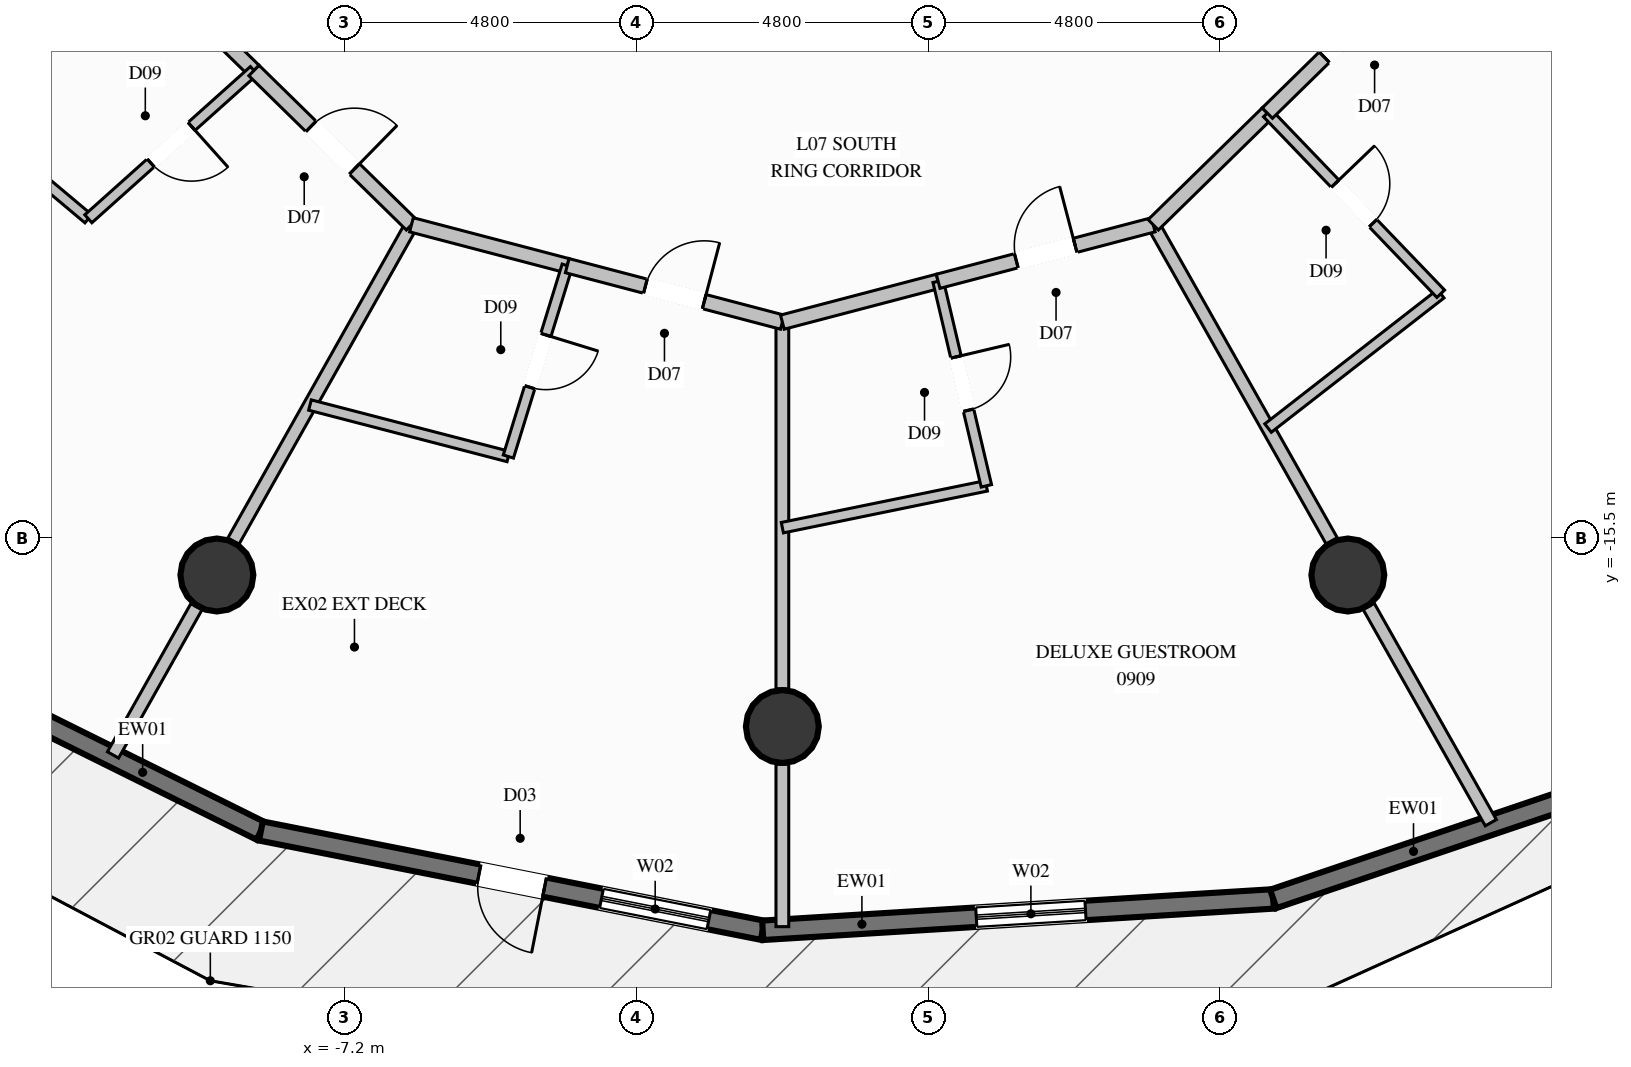
"""IFC4 building model, lengths in metres.
Left out: names, types, materials, properties, quantities, classifications, styles, units other than length and angle.
Written with IfcOpenShell. Run it as: python <this file> out.ifc"""

import sys

from ifc_helpers import new_model, si_unit, direction, frame, frame_2d, origin, origin_2d, place, context, subcontext, project, spatial, rectangle, circle, extrude, element, fill, save


model = new_model("IFC4")
c1 = context("Model", 3, precision=1e-05, world=origin(), true_north=direction((0.0, 1.0)))
c2 = subcontext(c1, "Body", "Model", "MODEL_VIEW")
j1 = project(units=[si_unit("LENGTHUNIT", "METRE"), si_unit("PLANEANGLEUNIT", "RADIAN")], contexts=[c1])
p1 = place(None, origin())
s1 = spatial("IfcSite", under=j1, at=p1, CompositionType="ELEMENT")
p2 = place(p1, origin())
s2 = spatial("IfcBuilding", under=s1, at=p2, CompositionType="ELEMENT")
p3 = place(p2, frame((0.0, 0.0, 35.6)))
s3 = spatial("IfcBuildingStorey", under=s2, at=p3, CompositionType="ELEMENT", Elevation=35.6)
for number, where, z_axis, x_axis in (
    (1, (-9.3, -16.108, 0.0), (0.0, 0.0, 1.0), (1.0, 0.0, 0.0)),
    (2, (0.0, -18.6, 0.0), (0.0, 0.0, 1.0), (1.0, 0.0, 0.0)),
    (3, (9.3, -16.108, 0.0), (0.0, 0.0, 1.0), (1.0, 0.0, 0.0)),
):
    element("IfcColumn", number, at=place(p3, frame(where, z_axis=z_axis, x_axis=x_axis)), inside=s3, PredefinedType="COLUMN", context=c2, shape_type="SweptSolid", body=[
        extrude(circle(Radius=0.6, at=origin_2d()), origin(), (0.0, 0.0, 1.0), 3.6),
    ])
p4 = place(p3, frame((-8.576, -20.318, 0.0), z_axis=(0.0, 0.0, 1.0), x_axis=(-0.895818759339, 0.444419565743, 0.0)))
e4 = element("IfcWall", 4, at=p4, inside=s3, PredefinedType="SOLIDWALL", context=c2, shape_type="SweptSolid", body=[
    extrude(rectangle(XDim=8.15, YDim=0.32, at=frame_2d((4.075, 0.0))), origin(), (0.0, 0.0, 1.0), 3.34),
])
p5 = place(p4, frame((4.592, 0.0, 0.35)))
e5 = element("IfcOpeningElement", 5, at=p5, cuts=e4, PredefinedType="OPENING", context=c2, shape_type="SweptSolid", body=[
    extrude(rectangle(XDim=1.8, YDim=2.6, at=frame_2d((0.9, 1.3))), frame((0.0, 0.17, 0.0), z_axis=(0.0, -1.0, 0.0), x_axis=(1.0, 0.0, 0.0)), (0.0, 0.0, 1.0), 0.34),
])
p6 = place(p3, frame((-0.323, -21.951, 0.0), z_axis=(0.0, 0.0, 1.0), x_axis=(-0.980984848571, 0.194084329288, 0.0)))
e6 = element("IfcWall", 6, at=p6, inside=s3, PredefinedType="SOLIDWALL", context=c2, shape_type="SweptSolid", body=[
    extrude(rectangle(XDim=8.413, YDim=0.32, at=frame_2d((4.207, 0.0))), origin(), (0.0, 0.0, 1.0), 3.34),
])
p7 = place(p6, frame((0.903, 0.0, 0.35)))
e7 = element("IfcOpeningElement", 7, at=p7, cuts=e6, PredefinedType="OPENING", context=c2, shape_type="SweptSolid", body=[
    extrude(rectangle(XDim=1.8, YDim=2.6, at=frame_2d((0.9, 1.3))), frame((0.0, 0.17, 0.0), z_axis=(0.0, -1.0, 0.0), x_axis=(1.0, 0.0, 0.0)), (0.0, 0.0, 1.0), 0.34),
])
p8 = place(p6, frame((3.657, 0.0, 0.0)))
e8 = element("IfcOpeningElement", 8, at=p8, cuts=e6, PredefinedType="OPENING", context=c2, shape_type="SweptSolid", body=[
    extrude(rectangle(XDim=1.1, YDim=2.2, at=frame_2d((0.55, 1.1))), frame((0.0, 0.17, 0.0), z_axis=(0.0, -1.0, 0.0), x_axis=(1.0, 0.0, 0.0)), (0.0, 0.0, 1.0), 0.34),
])
p9 = place(p3, frame((8.073, -21.435, 0.0), z_axis=(0.0, 0.0, 1.0), x_axis=(-0.998117750792, -0.06132663005, 0.0)))
e9 = element("IfcWall", 9, at=p9, inside=s3, PredefinedType="SOLIDWALL", context=c2, shape_type="SweptSolid", body=[
    extrude(rectangle(XDim=8.412, YDim=0.32, at=frame_2d((4.206, 0.0))), origin(), (0.0, 0.0, 1.0), 3.34),
])
p10 = place(p9, frame((3.093, 0.0, 0.35)))
e10 = element("IfcOpeningElement", 10, at=p10, cuts=e9, PredefinedType="OPENING", context=c2, shape_type="SweptSolid", body=[
    extrude(rectangle(XDim=1.8, YDim=2.6, at=frame_2d((0.9, 1.3))), frame((0.0, 0.17, 0.0), z_axis=(0.0, -1.0, 0.0), x_axis=(1.0, 0.0, 0.0)), (0.0, 0.0, 1.0), 0.34),
])
p11 = place(p3, frame((15.793, -18.821, 0.0), z_axis=(0.0, 0.0, 1.0), x_axis=(-0.94717495877, -0.320717317085, 0.0)))
e11 = element("IfcWall", 11, at=p11, inside=s3, PredefinedType="SOLIDWALL", context=c2, shape_type="SweptSolid", body=[
    extrude(rectangle(XDim=8.151, YDim=0.32, at=frame_2d((4.075, 0.0))), origin(), (0.0, 0.0, 1.0), 3.34),
])
p12 = place(p11, frame((1.229, 0.0, 0.35)))
e12 = element("IfcOpeningElement", 12, at=p12, cuts=e11, PredefinedType="OPENING", context=c2, shape_type="SweptSolid", body=[
    extrude(rectangle(XDim=1.8, YDim=2.6, at=frame_2d((0.9, 1.3))), frame((0.0, 0.17, 0.0), z_axis=(0.0, -1.0, 0.0), x_axis=(1.0, 0.0, 0.0)), (0.0, 0.0, 1.0), 0.34),
])
p13 = place(p3, frame((-10.566, -5.975, 0.0), z_axis=(0.0, 0.0, 1.0), x_axis=(-0.861473203585, -0.507803032194, 0.0)))
e13 = element("IfcWall", 13, at=p13, inside=s3, PredefinedType="PARTITIONING", context=c2, shape_type="SweptSolid", body=[
    extrude(rectangle(XDim=5.845, YDim=0.21, at=frame_2d((2.922, 0.0))), origin(), (0.0, 0.0, 1.0), 2.707),
])
p14 = place(p3, frame((-6.1, -10.349, 0.0), z_axis=(0.0, 0.0, 1.0), x_axis=(-0.490503945764, -0.871438970433, 0.0)))
e14 = element("IfcWall", 14, at=p14, inside=s3, PredefinedType="PARTITIONING", context=c2, shape_type="SweptSolid", body=[
    extrude(rectangle(XDim=5.969, YDim=0.21, at=frame_2d((2.985, 0.0))), origin(), (0.0, 0.0, 1.0), 2.707),
])
p15 = place(p3, frame((-9.636, -16.629, 0.0), z_axis=(0.0, 0.0, 1.0), x_axis=(-0.490451821351, -0.871468307475, 0.0)))
e15 = element("IfcWall", 15, at=p15, inside=s3, PredefinedType="PARTITIONING", context=c2, shape_type="SweptSolid", body=[
    extrude(rectangle(XDim=2.798, YDim=0.21, at=frame_2d((1.399, 0.0))), origin(), (0.0, 0.0, 1.0), 3.34),
])
p16 = place(p3, frame((0.0, -11.95, 0.0), z_axis=(0.0, 0.0, 1.0), x_axis=(0.0, -1.0, 0.0)))
e16 = element("IfcWall", 16, at=p16, inside=s3, PredefinedType="PARTITIONING", context=c2, shape_type="SweptSolid", body=[
    extrude(rectangle(XDim=6.03, YDim=0.21, at=frame_2d((3.015, 0.0))), origin(), (0.0, 0.0, 1.0), 2.707),
])
p17 = place(p3, frame((0.0, -19.22, 0.0), z_axis=(0.0, 0.0, 1.0), x_axis=(0.0, -1.0, 0.0)))
e17 = element("IfcWall", 17, at=p17, inside=s3, PredefinedType="PARTITIONING", context=c2, shape_type="SweptSolid", body=[
    extrude(rectangle(XDim=2.671, YDim=0.21, at=frame_2d((1.335, 0.0))), origin(), (0.0, 0.0, 1.0), 3.34),
])
p18 = place(p3, frame((6.1, -10.349, 0.0), z_axis=(0.0, 0.0, 1.0), x_axis=(0.491652896219, -0.870791266401, 0.0)))
e18 = element("IfcWall", 18, at=p18, inside=s3, PredefinedType="PARTITIONING", context=c2, shape_type="SweptSolid", body=[
    extrude(rectangle(XDim=5.969, YDim=0.21, at=frame_2d((2.985, 0.0))), origin(), (0.0, 0.0, 1.0), 2.707),
])
p19 = place(p3, frame((9.643, -16.624, 0.0), z_axis=(0.0, 0.0, 1.0), x_axis=(0.491698874435, -0.87076530528, 0.0)))
e19 = element("IfcWall", 19, at=p19, inside=s3, PredefinedType="PARTITIONING", context=c2, shape_type="SweptSolid", body=[
    extrude(rectangle(XDim=4.086, YDim=0.21, at=frame_2d((2.043, 0.0))), origin(), (0.0, 0.0, 1.0), 3.34),
])
p20 = place(p3, frame((10.566, -5.975, 0.0), z_axis=(0.0, 0.0, 1.0), x_axis=(0.862217531027, -0.506538181374, 0.0)))
e20 = element("IfcWall", 20, at=p20, inside=s3, PredefinedType="PARTITIONING", context=c2, shape_type="SweptSolid", body=[
    extrude(rectangle(XDim=5.845, YDim=0.21, at=frame_2d((2.923, 0.0))), origin(), (0.0, 0.0, 1.0), 2.707),
])
p21 = place(p3, frame((-10.566, -5.975, 0.0), z_axis=(0.0, 0.0, 1.0), x_axis=(0.714506552913, -0.699628748584, 0.0)))
e21 = element("IfcWall", 21, at=p21, inside=s3, PredefinedType="PARTITIONING", context=c2, shape_type="SweptSolid", body=[
    extrude(rectangle(XDim=2.625, YDim=0.24, at=frame_2d((1.313, 0.0))), origin(), (0.0, 0.0, 1.0), 3.34),
])
p22 = place(p3, frame((-14.055, -8.032, 0.0), z_axis=(0.0, 0.0, 1.0), x_axis=(0.765749489357, -0.643138958196, 0.0)))
e22 = element("IfcWall", 22, at=p22, inside=s3, PredefinedType="PLUMBINGWALL", context=c2, shape_type="SweptSolid", body=[
    extrude(rectangle(XDim=3.449, YDim=0.175, at=frame_2d((1.724, 0.0))), origin(), (0.0, 0.0, 1.0), 3.34),
])
p23 = place(p3, frame((-8.69, -7.812, 0.0), z_axis=(0.0, 0.0, 1.0), x_axis=(-0.745157470099, -0.666888554975, 0.0)))
e23 = element("IfcWall", 23, at=p23, inside=s3, PredefinedType="PLUMBINGWALL", context=c2, shape_type="SweptSolid", body=[
    extrude(rectangle(XDim=3.656, YDim=0.175, at=frame_2d((1.828, 0.0))), origin(), (0.0, 0.0, 1.0), 3.34),
])
p24 = place(p23, frame((1.378, 0.0, 0.0)))
e24 = element("IfcOpeningElement", 24, at=p24, cuts=e23, PredefinedType="OPENING", context=c2, shape_type="SweptSolid", body=[
    extrude(rectangle(XDim=0.9, YDim=2.1, at=frame_2d((0.45, 1.05))), frame((0.0, 0.098, 0.0), z_axis=(0.0, -1.0, 0.0), x_axis=(1.0, 0.0, 0.0)), (0.0, 0.0, 1.0), 0.195),
])
p25 = place(p3, frame((-8.69, -7.812, 0.0), z_axis=(0.0, 0.0, 1.0), x_axis=(0.714342093268, -0.699796666029, 0.0)))
e25 = element("IfcWall", 25, at=p25, inside=s3, PredefinedType="PARTITIONING", context=c2, shape_type="SweptSolid", body=[
    extrude(rectangle(XDim=3.625, YDim=0.24, at=frame_2d((1.813, 0.0))), origin(), (0.0, 0.0, 1.0), 3.34),
])
p26 = place(p25, frame((1.313, 0.0, 0.0)))
e26 = element("IfcOpeningElement", 26, at=p26, cuts=e25, PredefinedType="OPENING", context=c2, shape_type="SweptSolid", body=[
    extrude(rectangle(XDim=1.0, YDim=2.2, at=frame_2d((0.5, 1.1))), frame((0.0, 0.13, 0.0), z_axis=(0.0, -1.0, 0.0), x_axis=(1.0, 0.0, 0.0)), (0.0, 0.0, 1.0), 0.26),
])
p27 = place(p3, frame((-6.1, -10.349, 0.0), z_axis=(0.0, 0.0, 1.0), x_axis=(0.967291490053, -0.253667446219, 0.0)))
e27 = element("IfcWall", 27, at=p27, inside=s3, PredefinedType="PARTITIONING", context=c2, shape_type="SweptSolid", body=[
    extrude(rectangle(XDim=2.649, YDim=0.24, at=frame_2d((1.324, 0.0))), origin(), (0.0, 0.0, 1.0), 3.34),
])
p28 = place(p3, frame((-7.769, -13.313, 0.0), z_axis=(0.0, 0.0, 1.0), x_axis=(0.96792648556, -0.251233593596, 0.0)))
e28 = element("IfcWall", 28, at=p28, inside=s3, PredefinedType="PLUMBINGWALL", context=c2, shape_type="SweptSolid", body=[
    extrude(rectangle(XDim=3.371, YDim=0.175, at=frame_2d((1.686, 0.0))), origin(), (0.0, 0.0, 1.0), 3.34),
])
p29 = place(p3, frame((-3.538, -11.021, 0.0), z_axis=(0.0, 0.0, 1.0), x_axis=(-0.294696857094, -0.955590792347, 0.0)))
e29 = element("IfcWall", 29, at=p29, inside=s3, PredefinedType="PLUMBINGWALL", context=c2, shape_type="SweptSolid", body=[
    extrude(rectangle(XDim=3.285, YDim=0.175, at=frame_2d((1.643, 0.0))), origin(), (0.0, 0.0, 1.0), 3.34),
])
p30 = place(p29, frame((1.192, 0.0, 0.0)))
e30 = element("IfcOpeningElement", 30, at=p30, cuts=e29, PredefinedType="OPENING", context=c2, shape_type="SweptSolid", body=[
    extrude(rectangle(XDim=0.9, YDim=2.1, at=frame_2d((0.45, 1.05))), frame((0.0, 0.098, 0.0), z_axis=(0.0, -1.0, 0.0), x_axis=(1.0, 0.0, 0.0)), (0.0, 0.0, 1.0), 0.195),
])
p31 = place(p3, frame((-3.538, -11.021, 0.0), z_axis=(0.0, 0.0, 1.0), x_axis=(0.96721703222, -0.253951201187, 0.0)))
e31 = element("IfcWall", 31, at=p31, inside=s3, PredefinedType="PARTITIONING", context=c2, shape_type="SweptSolid", body=[
    extrude(rectangle(XDim=3.658, YDim=0.24, at=frame_2d((1.829, 0.0))), origin(), (0.0, 0.0, 1.0), 2.917),
])
p32 = place(p31, frame((1.329, 0.0, 0.0)))
e32 = element("IfcOpeningElement", 32, at=p32, cuts=e31, PredefinedType="OPENING", context=c2, shape_type="SweptSolid", body=[
    extrude(rectangle(XDim=1.0, YDim=2.2, at=frame_2d((0.5, 1.1))), frame((0.0, 0.13, 0.0), z_axis=(0.0, -1.0, 0.0), x_axis=(1.0, 0.0, 0.0)), (0.0, 0.0, 1.0), 0.26),
])
p33 = place(p3, frame((0.0, -11.95, 0.0), z_axis=(0.0, 0.0, 1.0), x_axis=(0.967291490053, 0.253667446219, 0.0)))
e33 = element("IfcWall", 33, at=p33, inside=s3, PredefinedType="PARTITIONING", context=c2, shape_type="SweptSolid", body=[
    extrude(rectangle(XDim=2.649, YDim=0.24, at=frame_2d((1.324, 0.0))), origin(), (0.0, 0.0, 1.0), 2.917),
])
p34 = place(p3, frame((0.0, -15.33, 0.0), z_axis=(0.0, 0.0, 1.0), x_axis=(0.979614932167, 0.20088450581, 0.0)))
e34 = element("IfcWall", 34, at=p34, inside=s3, PredefinedType="PLUMBINGWALL", context=c2, shape_type="SweptSolid", body=[
    extrude(rectangle(XDim=3.425, YDim=0.175, at=frame_2d((1.712, 0.0))), origin(), (0.0, 0.0, 1.0), 3.34),
])
p35 = place(p3, frame((2.562, -11.278, 0.0), z_axis=(0.0, 0.0, 1.0), x_axis=(0.229433036384, -0.973324448381, 0.0)))
e35 = element("IfcWall", 35, at=p35, inside=s3, PredefinedType="PLUMBINGWALL", context=c2, shape_type="SweptSolid", body=[
    extrude(rectangle(XDim=3.456, YDim=0.175, at=frame_2d((1.728, 0.0))), origin(), (0.0, 0.0, 1.0), 3.34),
])
p36 = place(p35, frame((1.278, 0.0, 0.0)))
e36 = element("IfcOpeningElement", 36, at=p36, cuts=e35, PredefinedType="OPENING", context=c2, shape_type="SweptSolid", body=[
    extrude(rectangle(XDim=0.9, YDim=2.1, at=frame_2d((0.45, 1.05))), frame((0.0, 0.098, 0.0), z_axis=(0.0, -1.0, 0.0), x_axis=(1.0, 0.0, 0.0)), (0.0, 0.0, 1.0), 0.195),
])
p37 = place(p3, frame((2.562, -11.278, 0.0), z_axis=(0.0, 0.0, 1.0), x_axis=(0.96721703222, 0.253951201187, 0.0)))
e37 = element("IfcWall", 37, at=p37, inside=s3, PredefinedType="PARTITIONING", context=c2, shape_type="SweptSolid", body=[
    extrude(rectangle(XDim=3.658, YDim=0.24, at=frame_2d((1.829, 0.0))), origin(), (0.0, 0.0, 1.0), 2.917),
])
p38 = place(p37, frame((1.329, 0.0, 0.0)))
e38 = element("IfcOpeningElement", 38, at=p38, cuts=e37, PredefinedType="OPENING", context=c2, shape_type="SweptSolid", body=[
    extrude(rectangle(XDim=1.0, YDim=2.2, at=frame_2d((0.5, 1.1))), frame((0.0, 0.13, 0.0), z_axis=(0.0, -1.0, 0.0), x_axis=(1.0, 0.0, 0.0)), (0.0, 0.0, 1.0), 0.26),
])
p39 = place(p3, frame((6.1, -10.349, 0.0), z_axis=(0.0, 0.0, 1.0), x_axis=(0.714460071513, 0.69967621527, 0.0)))
e39 = element("IfcWall", 39, at=p39, inside=s3, PredefinedType="PARTITIONING", context=c2, shape_type="SweptSolid", body=[
    extrude(rectangle(XDim=2.626, YDim=0.24, at=frame_2d((1.313, 0.0))), origin(), (0.0, 0.0, 1.0), 3.34),
])
p40 = place(p3, frame((7.988, -13.692, 0.0), z_axis=(0.0, 0.0, 1.0), x_axis=(0.78932298539, 0.613978195651, 0.0)))
e40 = element("IfcWall", 40, at=p40, inside=s3, PredefinedType="PLUMBINGWALL", context=c2, shape_type="SweptSolid", body=[
    extrude(rectangle(XDim=3.598, YDim=0.175, at=frame_2d((1.799, 0.0))), origin(), (0.0, 0.0, 1.0), 3.34),
])
p41 = place(p3, frame((7.976, -8.512, 0.0), z_axis=(0.0, 0.0, 1.0), x_axis=(0.692493571669, -0.721424045342, 0.0)))
e41 = element("IfcWall", 41, at=p41, inside=s3, PredefinedType="PLUMBINGWALL", context=c2, shape_type="SweptSolid", body=[
    extrude(rectangle(XDim=4.118, YDim=0.175, at=frame_2d((2.059, 0.0))), origin(), (0.0, 0.0, 1.0), 3.34),
])
p42 = place(p41, frame((1.609, 0.0, 0.0)))
e42 = element("IfcOpeningElement", 42, at=p42, cuts=e41, PredefinedType="OPENING", context=c2, shape_type="SweptSolid", body=[
    extrude(rectangle(XDim=0.9, YDim=2.1, at=frame_2d((0.45, 1.05))), frame((0.0, 0.098, 0.0), z_axis=(0.0, -1.0, 0.0), x_axis=(1.0, 0.0, 0.0)), (0.0, 0.0, 1.0), 0.195),
])
p43 = place(p3, frame((7.976, -8.512, 0.0), z_axis=(0.0, 0.0, 1.0), x_axis=(0.714375756875, 0.699762301064, 0.0)))
e43 = element("IfcWall", 43, at=p43, inside=s3, PredefinedType="PARTITIONING", context=c2, shape_type="SweptSolid", body=[
    extrude(rectangle(XDim=3.625, YDim=0.24, at=frame_2d((1.812, 0.0))), origin(), (0.0, 0.0, 1.0), 3.34),
])
p44 = place(p43, frame((1.313, 0.0, 0.0)))
e44 = element("IfcOpeningElement", 44, at=p44, cuts=e43, PredefinedType="OPENING", context=c2, shape_type="SweptSolid", body=[
    extrude(rectangle(XDim=1.0, YDim=2.2, at=frame_2d((0.5, 1.1))), frame((0.0, 0.13, 0.0), z_axis=(0.0, -1.0, 0.0), x_axis=(1.0, 0.0, 0.0)), (0.0, 0.0, 1.0), 0.26),
])
p45 = place(p7, origin())
e45 = element("IfcWindow", 45, at=p45, inside=s3, PartitioningType="SINGLE_PANEL", PredefinedType="WINDOW", context=c2, shape_type="SweptSolid", body=[
    extrude(rectangle(XDim=1.8, YDim=2.6, at=frame_2d((0.9, 1.3))), frame((0.0, 0.03, 0.0), z_axis=(0.0, -1.0, 0.0), x_axis=(1.0, 0.0, 0.0)), (0.0, 0.0, 1.0), 0.06),
])
fill(e7, e45)
p46 = place(p8, origin())
e46 = element("IfcDoor", 46, at=p46, inside=s3, OperationType="SINGLE_SWING_LEFT", PredefinedType="DOOR", context=c2, shape_type="SweptSolid", body=[
    extrude(rectangle(XDim=1.1, YDim=2.2, at=frame_2d((0.55, 1.1))), frame((0.0, 0.025, 0.0), z_axis=(0.0, -1.0, 0.0), x_axis=(1.0, 0.0, 0.0)), (0.0, 0.0, 1.0), 0.05),
])
fill(e8, e46)
p47 = place(p10, origin())
e47 = element("IfcWindow", 47, at=p47, inside=s3, PartitioningType="SINGLE_PANEL", PredefinedType="WINDOW", context=c2, shape_type="SweptSolid", body=[
    extrude(rectangle(XDim=1.8, YDim=2.6, at=frame_2d((0.9, 1.3))), frame((0.0, 0.03, 0.0), z_axis=(0.0, -1.0, 0.0), x_axis=(1.0, 0.0, 0.0)), (0.0, 0.0, 1.0), 0.06),
])
fill(e10, e47)
p48 = place(p24, origin())
e48 = element("IfcDoor", 48, at=p48, inside=s3, OperationType="SINGLE_SWING_LEFT", PredefinedType="DOOR", context=c2, shape_type="SweptSolid", body=[
    extrude(rectangle(XDim=0.9, YDim=2.1, at=frame_2d((0.45, 1.05))), frame((0.0, 0.025, 0.0), z_axis=(0.0, -1.0, 0.0), x_axis=(1.0, 0.0, 0.0)), (0.0, 0.0, 1.0), 0.05),
])
fill(e24, e48)
p49 = place(p26, origin())
e49 = element("IfcDoor", 49, at=p49, inside=s3, OperationType="SINGLE_SWING_RIGHT", PredefinedType="DOOR", context=c2, shape_type="SweptSolid", body=[
    extrude(rectangle(XDim=1.0, YDim=2.2, at=frame_2d((0.5, 1.1))), frame((0.0, 0.025, 0.0), z_axis=(0.0, -1.0, 0.0), x_axis=(1.0, 0.0, 0.0)), (0.0, 0.0, 1.0), 0.05),
])
fill(e26, e49)
p50 = place(p30, origin())
e50 = element("IfcDoor", 50, at=p50, inside=s3, OperationType="SINGLE_SWING_LEFT", PredefinedType="DOOR", context=c2, shape_type="SweptSolid", body=[
    extrude(rectangle(XDim=0.9, YDim=2.1, at=frame_2d((0.45, 1.05))), frame((0.0, 0.025, 0.0), z_axis=(0.0, -1.0, 0.0), x_axis=(1.0, 0.0, 0.0)), (0.0, 0.0, 1.0), 0.05),
])
fill(e30, e50)
p51 = place(p32, origin())
e51 = element("IfcDoor", 51, at=p51, inside=s3, OperationType="SINGLE_SWING_RIGHT", PredefinedType="DOOR", context=c2, shape_type="SweptSolid", body=[
    extrude(rectangle(XDim=1.0, YDim=2.2, at=frame_2d((0.5, 1.1))), frame((0.0, 0.025, 0.0), z_axis=(0.0, -1.0, 0.0), x_axis=(1.0, 0.0, 0.0)), (0.0, 0.0, 1.0), 0.05),
])
fill(e32, e51)
p52 = place(p36, origin())
e52 = element("IfcDoor", 52, at=p52, inside=s3, OperationType="SINGLE_SWING_LEFT", PredefinedType="DOOR", context=c2, shape_type="SweptSolid", body=[
    extrude(rectangle(XDim=0.9, YDim=2.1, at=frame_2d((0.45, 1.05))), frame((0.0, 0.025, 0.0), z_axis=(0.0, -1.0, 0.0), x_axis=(1.0, 0.0, 0.0)), (0.0, 0.0, 1.0), 0.05),
])
fill(e36, e52)
p53 = place(p38, origin())
e53 = element("IfcDoor", 53, at=p53, inside=s3, OperationType="SINGLE_SWING_RIGHT", PredefinedType="DOOR", context=c2, shape_type="SweptSolid", body=[
    extrude(rectangle(XDim=1.0, YDim=2.2, at=frame_2d((0.5, 1.1))), frame((0.0, 0.025, 0.0), z_axis=(0.0, -1.0, 0.0), x_axis=(1.0, 0.0, 0.0)), (0.0, 0.0, 1.0), 0.05),
])
fill(e38, e53)
p54 = place(p42, origin())
e54 = element("IfcDoor", 54, at=p54, inside=s3, OperationType="SINGLE_SWING_LEFT", PredefinedType="DOOR", context=c2, shape_type="SweptSolid", body=[
    extrude(rectangle(XDim=0.9, YDim=2.1, at=frame_2d((0.45, 1.05))), frame((0.0, 0.025, 0.0), z_axis=(0.0, -1.0, 0.0), x_axis=(1.0, 0.0, 0.0)), (0.0, 0.0, 1.0), 0.05),
])
fill(e42, e54)
p55 = place(p44, origin())
e55 = element("IfcDoor", 55, at=p55, inside=s3, OperationType="SINGLE_SWING_RIGHT", PredefinedType="DOOR", context=c2, shape_type="SweptSolid", body=[
    extrude(rectangle(XDim=1.0, YDim=2.2, at=frame_2d((0.5, 1.1))), frame((0.0, 0.025, 0.0), z_axis=(0.0, -1.0, 0.0), x_axis=(1.0, 0.0, 0.0)), (0.0, 0.0, 1.0), 0.05),
])
fill(e44, e55)
save(model, sys.argv[1])
